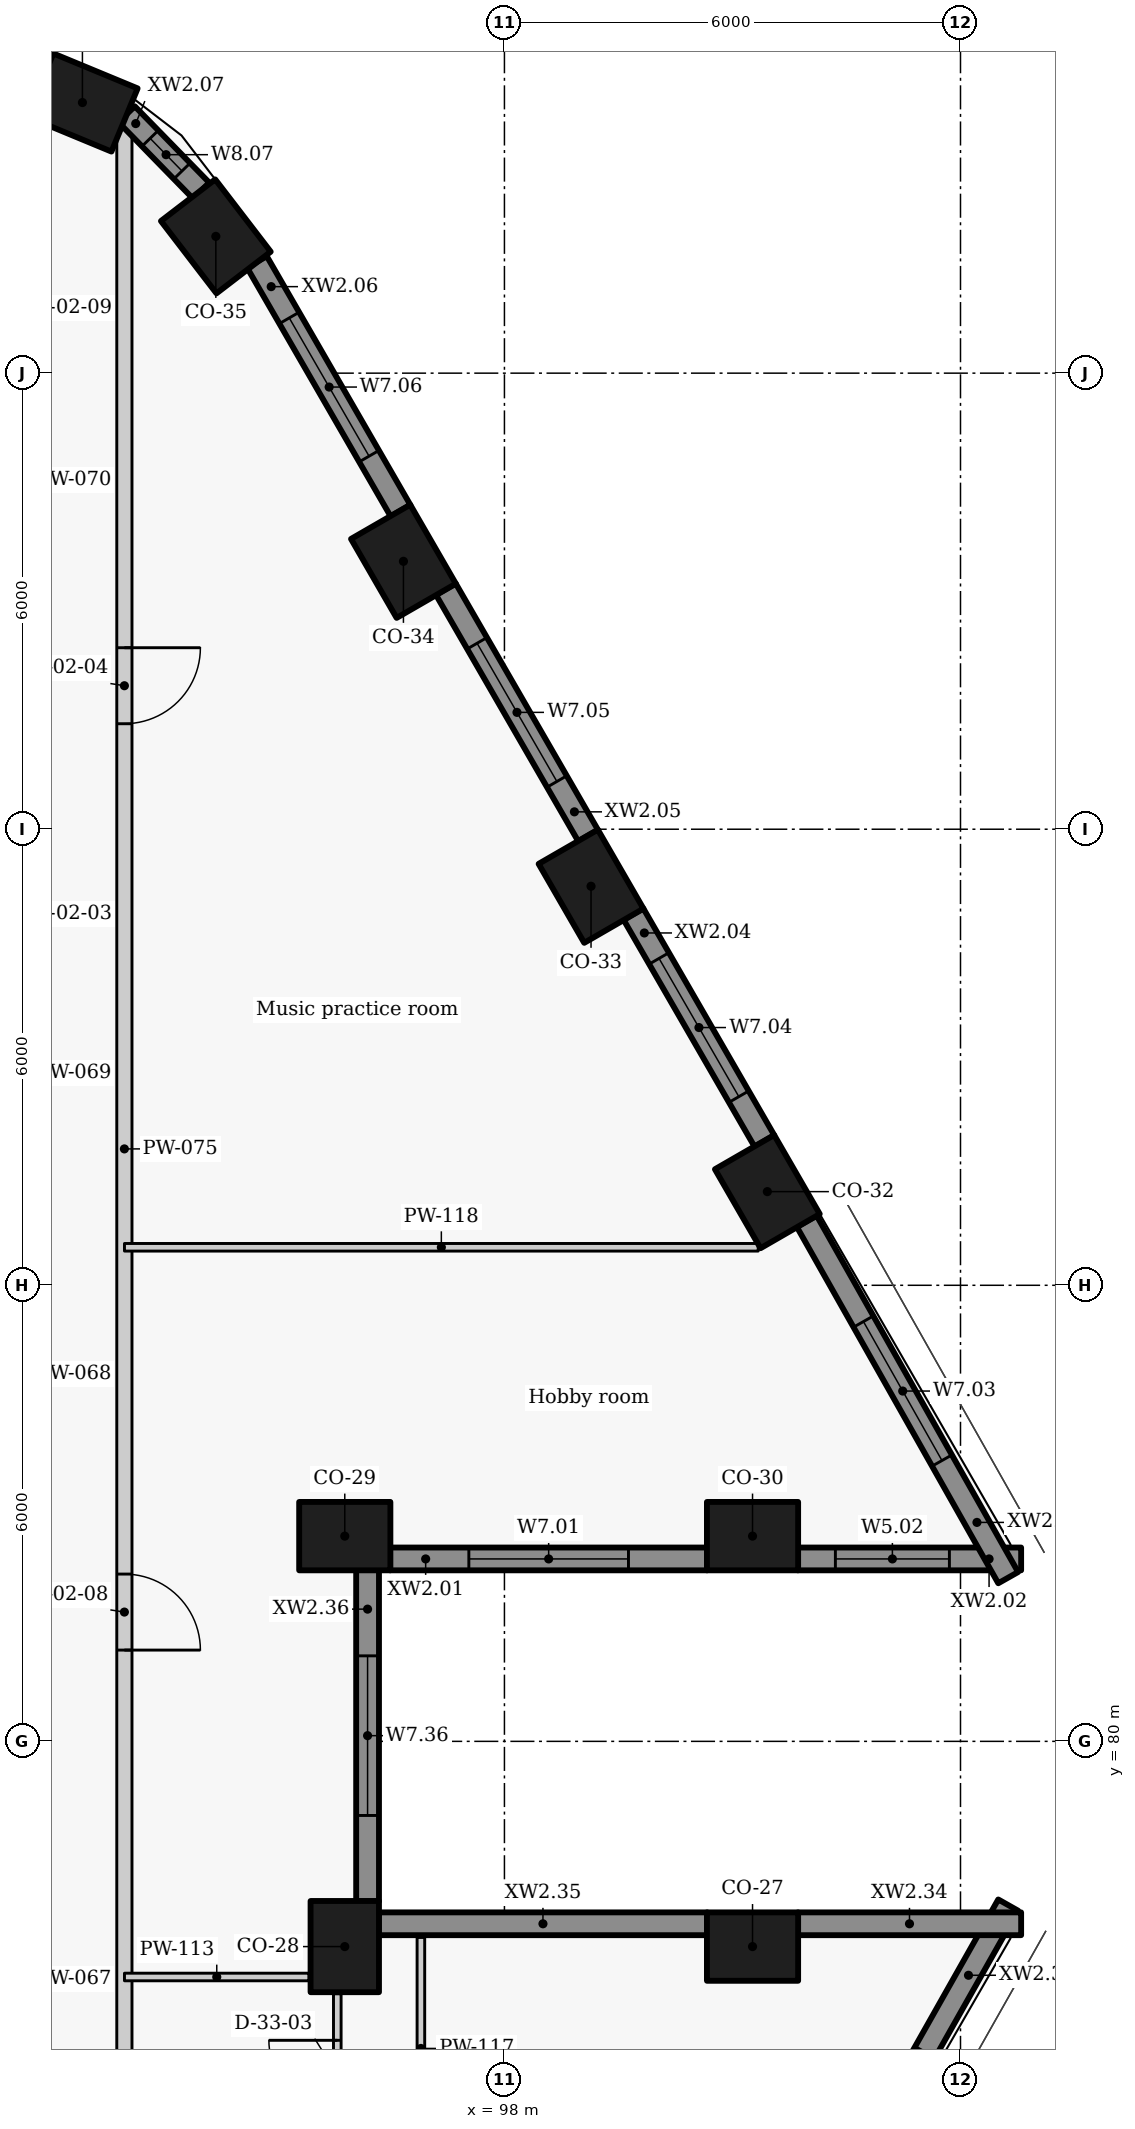
"""IFC4 building model, lengths in metres.
Left out: names, types, materials, properties, quantities, classifications, styles, units other than length and angle.
Written with IfcOpenShell. Run it as: python <this file> out.ifc"""

import sys

from ifc_helpers import new_model, si_unit, direction, frame, frame_2d, origin, origin_2d, place, context, subcontext, project, spatial, rectangle, extrude, element, fill, save


model = new_model("IFC4")
c1 = context("Model", 3, precision=1e-05, world=origin(), true_north=direction((0.0, 1.0)))
c2 = subcontext(c1, "Body", "Model", "MODEL_VIEW")
j1 = project(units=[si_unit("LENGTHUNIT", "METRE"), si_unit("PLANEANGLEUNIT", "RADIAN")], contexts=[c1])
p1 = place(None, origin())
s1 = spatial("IfcSite", under=j1, at=p1, CompositionType="ELEMENT")
p2 = place(p1, origin())
s2 = spatial("IfcBuilding", under=s1, at=p2, CompositionType="ELEMENT")
p3 = place(p2, frame((0.0, 0.0, 213.0)))
s3 = spatial("IfcBuildingStorey", under=s2, at=p3, CompositionType="ELEMENT", Elevation=213.0)
for number, where, z_axis, x_axis in (
    (1, (101.264, 77.3, 0.0), (0.0, 0.0, 1.0), (-1.0, 0.0, 0.0)),
    (2, (95.899, 77.3, 0.0), (0.0, 0.0, 1.0), (0.0, 1.0, 0.0)),
    (3, (95.899, 82.7, 0.0), (0.0, 0.0, 1.0), (1.0, 0.0, 0.0)),
    (4, (101.264, 82.7, 0.0), (0.0, 0.0, 1.0), (1.0, 0.0, 0.0)),
    (5, (101.459, 87.232, 0.0), (0.0, 0.0, 1.0), (-0.5, 0.866, 0.0)),
    (6, (99.139, 91.25, 0.0), (0.0, 0.0, 1.0), (-0.5, 0.866, 0.0)),
    (7, (96.671, 95.525, 0.0), (0.0, 0.0, 1.0), (-0.5, 0.866, 0.0)),
    (8, (94.203, 99.8, 0.0), (0.0, 0.0, 1.0), (-0.609, 0.793, 0.0)),
    (9, (92.448, 101.56, 0.0), (0.0, 0.0, 1.0), (-0.924, 0.383, 0.0)),
):
    element("IfcColumn", number, at=place(p3, frame(where, z_axis=z_axis, x_axis=x_axis)), inside=s3, PredefinedType="COLUMN", context=c2, shape_type="SweptSolid", body=[
        extrude(rectangle(XDim=1.2, YDim=0.9, at=origin_2d()), origin(), (0.0, 0.0, 1.0), 3.3),
    ])
p4 = place(p3, frame((96.496, 82.4, 0.0), z_axis=(0.0, 0.0, 1.0), x_axis=(1.0, 0.0, 0.0)))
e10 = element("IfcWall", 10, at=p4, inside=s3, PredefinedType="SOLIDWALL", context=c2, shape_type="SweptSolid", body=[
    extrude(rectangle(XDim=4.172, YDim=0.3, at=frame_2d((2.086, 0.0))), origin(), (0.0, 0.0, 1.0), 2.425),
])
p5 = place(p4, frame((1.036, 0.0, 0.9)))
e11 = element("IfcOpeningElement", 11, at=p5, cuts=e10, PredefinedType="OPENING", context=c2, shape_type="SweptSolid", body=[
    extrude(rectangle(XDim=2.1, YDim=1.1, at=frame_2d((1.05, 0.55))), frame((0.0, 0.16, 0.0), z_axis=(0.0, -1.0, 0.0), x_axis=(1.0, 0.0, 0.0)), (0.0, 0.0, 1.0), 0.32),
])
p6 = place(p3, frame((101.86, 82.4, 0.0), z_axis=(0.0, 0.0, 1.0), x_axis=(1.0, 0.0, 0.0)))
e12 = element("IfcWall", 12, at=p6, inside=s3, PredefinedType="SOLIDWALL", context=c2, shape_type="SweptSolid", body=[
    extrude(rectangle(XDim=2.938, YDim=0.3, at=frame_2d((1.469, 0.0))), origin(), (0.0, 0.0, 1.0), 2.425),
])
p7 = place(p6, frame((0.494, 0.0, 0.9)))
e13 = element("IfcOpeningElement", 13, at=p7, cuts=e12, PredefinedType="OPENING", context=c2, shape_type="SweptSolid", body=[
    extrude(rectangle(XDim=1.5, YDim=1.1, at=frame_2d((0.75, 0.55))), frame((0.0, 0.16, 0.0), z_axis=(0.0, -1.0, 0.0), x_axis=(1.0, 0.0, 0.0)), (0.0, 0.0, 1.0), 0.32),
])
p8 = place(p3, frame((104.627, 82.154, 0.0), z_axis=(0.0, 0.0, 1.0), x_axis=(-0.492033360928, 0.870576344575, 0.0)))
e14 = element("IfcWall", 14, at=p8, inside=s3, PredefinedType="SOLIDWALL", context=c2, shape_type="SweptSolid", body=[
    extrude(rectangle(XDim=5.387, YDim=0.3, at=frame_2d((2.693, 0.0))), origin(), (0.0, 0.0, 1.0), 2.425),
])
p9 = place(p8, frame((1.77, 0.0, 0.9)))
e15 = element("IfcOpeningElement", 15, at=p9, cuts=e14, PredefinedType="OPENING", context=c2, shape_type="SweptSolid", body=[
    extrude(rectangle(XDim=2.1, YDim=1.1, at=frame_2d((1.05, 0.55))), frame((0.0, 0.16, 0.0), z_axis=(0.0, -1.0, 0.0), x_axis=(1.0, 0.0, 0.0)), (0.0, 0.0, 1.0), 0.32),
])
p10 = place(p3, frame((101.421, 87.898, 0.0), z_axis=(0.0, 0.0, 1.0), x_axis=(-0.499955427682, 0.866051136095, 0.0)))
e16 = element("IfcWall", 16, at=p10, inside=s3, PredefinedType="SOLIDWALL", context=c2, shape_type="SweptSolid", body=[
    extrude(rectangle(XDim=3.447, YDim=0.3, at=frame_2d((1.724, 0.0))), origin(), (0.0, 0.0, 1.0), 2.425),
])
p11 = place(p10, frame((0.674, 0.0, 0.9)))
e17 = element("IfcOpeningElement", 17, at=p11, cuts=e16, PredefinedType="OPENING", context=c2, shape_type="SweptSolid", body=[
    extrude(rectangle(XDim=2.1, YDim=1.1, at=frame_2d((1.05, 0.55))), frame((0.0, 0.16, 0.0), z_axis=(0.0, -1.0, 0.0), x_axis=(1.0, 0.0, 0.0)), (0.0, 0.0, 1.0), 0.32),
])
p12 = place(p3, frame((99.101, 91.916, 0.0), z_axis=(0.0, 0.0, 1.0), x_axis=(-0.500059225181, 0.86599120741, 0.0)))
e18 = element("IfcWall", 18, at=p12, inside=s3, PredefinedType="SOLIDWALL", context=c2, shape_type="SweptSolid", body=[
    extrude(rectangle(XDim=3.744, YDim=0.3, at=frame_2d((1.872, 0.0))), origin(), (0.0, 0.0, 1.0), 2.425),
])
p13 = place(p12, frame((0.822, 0.0, 0.9)))
e19 = element("IfcOpeningElement", 19, at=p13, cuts=e18, PredefinedType="OPENING", context=c2, shape_type="SweptSolid", body=[
    extrude(rectangle(XDim=2.1, YDim=1.1, at=frame_2d((1.05, 0.55))), frame((0.0, 0.16, 0.0), z_axis=(0.0, -1.0, 0.0), x_axis=(1.0, 0.0, 0.0)), (0.0, 0.0, 1.0), 0.32),
])
p14 = place(p3, frame((96.633, 96.191, 0.0), z_axis=(0.0, 0.0, 1.0), x_axis=(-0.499961087031, 0.866047869032, 0.0)))
e20 = element("IfcWall", 20, at=p14, inside=s3, PredefinedType="SOLIDWALL", context=c2, shape_type="SweptSolid", body=[
    extrude(rectangle(XDim=3.779, YDim=0.3, at=frame_2d((1.889, 0.0))), origin(), (0.0, 0.0, 1.0), 2.425),
])
p15 = place(p14, frame((0.828, 0.0, 0.9)))
e21 = element("IfcOpeningElement", 21, at=p15, cuts=e20, PredefinedType="OPENING", context=c2, shape_type="SweptSolid", body=[
    extrude(rectangle(XDim=2.1, YDim=1.1, at=frame_2d((1.05, 0.55))), frame((0.0, 0.16, 0.0), z_axis=(0.0, -1.0, 0.0), x_axis=(1.0, 0.0, 0.0)), (0.0, 0.0, 1.0), 0.32),
])
p16 = place(p3, frame((94.009, 100.402, 0.0), z_axis=(0.0, 0.0, 1.0), x_axis=(-0.69817596362, 0.715926199984, 0.0)))
e22 = element("IfcWall", 22, at=p16, inside=s3, PredefinedType="SOLIDWALL", context=c2, shape_type="SweptSolid", body=[
    extrude(rectangle(XDim=1.403, YDim=0.3, at=frame_2d((0.701, 0.0))), origin(), (0.0, 0.0, 1.0), 2.425),
])
p17 = place(p16, frame((0.36, 0.0, 0.9)))
e23 = element("IfcOpeningElement", 23, at=p17, cuts=e22, PredefinedType="OPENING", context=c2, shape_type="SweptSolid", body=[
    extrude(rectangle(XDim=0.6, YDim=1.1, at=frame_2d((0.3, 0.55))), frame((0.0, 0.16, 0.0), z_axis=(0.0, -1.0, 0.0), x_axis=(1.0, 0.0, 0.0)), (0.0, 0.0, 1.0), 0.32),
])
p18 = place(p3, frame((101.977, 73.157, 0.0), z_axis=(0.0, 0.0, 1.0), x_axis=(0.492033360928, 0.870576344575, 0.0)))
e24 = element("IfcWall", 24, at=p18, inside=s3, PredefinedType="SOLIDWALL", context=c2, shape_type="SweptSolid", body=[
    extrude(rectangle(XDim=5.387, YDim=0.3, at=frame_2d((2.693, 0.0))), origin(), (0.0, 0.0, 1.0), 2.425),
])
p19 = place(p18, frame((1.064, 0.0, 0.9)))
e25 = element("IfcOpeningElement", 25, at=p19, cuts=e24, PredefinedType="OPENING", context=c2, shape_type="SweptSolid", body=[
    extrude(rectangle(XDim=2.1, YDim=1.1, at=frame_2d((1.05, 0.55))), frame((0.0, 0.16, 0.0), z_axis=(0.0, -1.0, 0.0), x_axis=(1.0, 0.0, 0.0)), (0.0, 0.0, 1.0), 0.32),
])
p20 = place(p3, frame((104.798, 77.6, 0.0), z_axis=(0.0, 0.0, 1.0), x_axis=(-1.0, 0.0, 0.0)))
e26 = element("IfcWall", 26, at=p20, inside=s3, PredefinedType="SOLIDWALL", context=c2, shape_type="SweptSolid", body=[
    extrude(rectangle(XDim=2.938, YDim=0.3, at=frame_2d((1.469, 0.0))), origin(), (0.0, 0.0, 1.0), 2.425),
])
p21 = place(p3, frame((100.668, 77.6, 0.0), z_axis=(0.0, 0.0, 1.0), x_axis=(-1.0, 0.0, 0.0)))
e27 = element("IfcWall", 27, at=p21, inside=s3, PredefinedType="SOLIDWALL", context=c2, shape_type="SweptSolid", body=[
    extrude(rectangle(XDim=4.323, YDim=0.3, at=frame_2d((2.161, 0.0))), origin(), (0.0, 0.0, 1.0), 2.425),
])
p22 = place(p3, frame((96.199, 77.896, 0.0), z_axis=(0.0, 0.0, 1.0), x_axis=(0.0, 1.0, 0.0)))
e28 = element("IfcWall", 28, at=p22, inside=s3, PredefinedType="SOLIDWALL", context=c2, shape_type="SweptSolid", body=[
    extrude(rectangle(XDim=4.358, YDim=0.3, at=frame_2d((2.179, 0.0))), origin(), (0.0, 0.0, 1.0), 2.425),
])
p23 = place(p22, frame((1.129, 0.0, 0.9)))
e29 = element("IfcOpeningElement", 29, at=p23, cuts=e28, PredefinedType="OPENING", context=c2, shape_type="SweptSolid", body=[
    extrude(rectangle(XDim=2.1, YDim=1.1, at=frame_2d((1.05, 0.55))), frame((0.0, 0.16, 0.0), z_axis=(0.0, -1.0, 0.0), x_axis=(1.0, 0.0, 0.0)), (0.0, 0.0, 1.0), 0.32),
])
p24 = place(p3, frame((93.0, 101.281, 0.0), z_axis=(0.0, 0.0, 1.0), x_axis=(0.0, -1.0, 0.0)))
e30 = element("IfcWall", 30, at=p24, inside=s3, PredefinedType="PARTITIONING", context=c2, shape_type="SweptSolid", body=[
    extrude(rectangle(XDim=42.606, YDim=0.2, at=frame_2d((21.303, 0.0))), origin(), (0.0, 0.0, 1.0), 2.405),
])
p25 = place(p24, frame((39.33, 0.0, 0.0)))
e31 = element("IfcOpeningElement", 31, at=p25, cuts=e30, PredefinedType="OPENING", context=c2, shape_type="SweptSolid", body=[
    extrude(rectangle(XDim=1.0, YDim=2.1, at=frame_2d((0.5, 1.05))), frame((0.0, 0.11, 0.0), z_axis=(0.0, -1.0, 0.0), x_axis=(1.0, 0.0, 0.0)), (0.0, 0.0, 1.0), 0.22),
])
p26 = place(p24, frame((28.98, 0.0, 0.0)))
e32 = element("IfcOpeningElement", 32, at=p26, cuts=e30, PredefinedType="OPENING", context=c2, shape_type="SweptSolid", body=[
    extrude(rectangle(XDim=1.0, YDim=2.1, at=frame_2d((0.5, 1.05))), frame((0.0, 0.11, 0.0), z_axis=(0.0, -1.0, 0.0), x_axis=(1.0, 0.0, 0.0)), (0.0, 0.0, 1.0), 0.22),
])
p27 = place(p24, frame((6.893, 0.0, 0.0)))
e33 = element("IfcOpeningElement", 33, at=p27, cuts=e30, PredefinedType="OPENING", context=c2, shape_type="SweptSolid", body=[
    extrude(rectangle(XDim=1.0, YDim=2.1, at=frame_2d((0.5, 1.05))), frame((0.0, 0.11, 0.0), z_axis=(0.0, -1.0, 0.0), x_axis=(1.0, 0.0, 0.0)), (0.0, 0.0, 1.0), 0.22),
])
p28 = place(p24, frame((19.08, 0.0, 0.0)))
e34 = element("IfcOpeningElement", 34, at=p28, cuts=e30, PredefinedType="OPENING", context=c2, shape_type="SweptSolid", body=[
    extrude(rectangle(XDim=1.0, YDim=2.1, at=frame_2d((0.5, 1.05))), frame((0.0, 0.11, 0.0), z_axis=(0.0, -1.0, 0.0), x_axis=(1.0, 0.0, 0.0)), (0.0, 0.0, 1.0), 0.22),
])
p29 = place(p3, frame((93.001, 76.9, 0.0), z_axis=(0.0, 0.0, 1.0), x_axis=(1.0, 0.0, 0.0)))
e35 = element("IfcWall", 35, at=p29, inside=s3, PredefinedType="PARTITIONING", context=c2, shape_type="SweptSolid", body=[
    extrude(rectangle(XDim=2.428, YDim=0.1, at=frame_2d((1.214, 0.0))), origin(), (0.0, 0.0, 1.0), 3.025),
])
p30 = place(p3, frame((95.801, 72.6, 0.0), z_axis=(0.0, 0.0, 1.0), x_axis=(0.0, 1.0, 0.0)))
e36 = element("IfcWall", 36, at=p30, inside=s3, PredefinedType="PARTITIONING", context=c2, shape_type="SweptSolid", body=[
    extrude(rectangle(XDim=4.08, YDim=0.1, at=frame_2d((2.04, 0.0))), origin(), (0.0, 0.0, 1.0), 3.025),
])
p31 = place(p30, frame((2.567, 0.0, 0.0)))
e37 = element("IfcOpeningElement", 37, at=p31, cuts=e36, PredefinedType="OPENING", context=c2, shape_type="SweptSolid", body=[
    extrude(rectangle(XDim=0.9, YDim=2.1, at=frame_2d((0.45, 1.05))), frame((0.0, 0.06, 0.0), z_axis=(0.0, -1.0, 0.0), x_axis=(1.0, 0.0, 0.0)), (0.0, 0.0, 1.0), 0.12),
])
p32 = place(p3, frame((96.901, 77.42, 0.0), z_axis=(0.0, 0.0, 1.0), x_axis=(0.0, -1.0, 0.0)))
e38 = element("IfcWall", 38, at=p32, inside=s3, PredefinedType="PARTITIONING", context=c2, shape_type="SweptSolid", body=[
    extrude(rectangle(XDim=6.42, YDim=0.1, at=frame_2d((3.21, 0.0))), origin(), (0.0, 0.0, 1.0), 2.405),
])
p33 = place(p32, frame((3.02, 0.0, 0.0)))
e39 = element("IfcOpeningElement", 39, at=p33, cuts=e38, PredefinedType="OPENING", context=c2, shape_type="SweptSolid", body=[
    extrude(rectangle(XDim=0.9, YDim=2.1, at=frame_2d((0.45, 1.05))), frame((0.0, 0.06, 0.0), z_axis=(0.0, -1.0, 0.0), x_axis=(1.0, 0.0, 0.0)), (0.0, 0.0, 1.0), 0.12),
])
p34 = place(p3, frame((93.001, 86.5, 0.0), z_axis=(0.0, 0.0, 1.0), x_axis=(1.0, 0.0, 0.0)))
e40 = element("IfcWall", 40, at=p34, inside=s3, PredefinedType="PARTITIONING", context=c2, shape_type="SweptSolid", body=[
    extrude(rectangle(XDim=8.338, YDim=0.1, at=frame_2d((4.169, 0.0))), origin(), (0.0, 0.0, 1.0), 3.025),
])
p35 = place(p5, origin())
e41 = element("IfcWindow", 41, at=p35, inside=s3, PartitioningType="SINGLE_PANEL", PredefinedType="WINDOW", context=c2, shape_type="SweptSolid", body=[
    extrude(rectangle(XDim=2.1, YDim=1.1, at=frame_2d((1.05, 0.55))), frame((0.0, 0.03, 0.0), z_axis=(0.0, -1.0, 0.0), x_axis=(1.0, 0.0, 0.0)), (0.0, 0.0, 1.0), 0.06),
])
fill(e11, e41)
p36 = place(p7, origin())
e42 = element("IfcWindow", 42, at=p36, inside=s3, PartitioningType="SINGLE_PANEL", PredefinedType="WINDOW", context=c2, shape_type="SweptSolid", body=[
    extrude(rectangle(XDim=1.5, YDim=1.1, at=frame_2d((0.75, 0.55))), frame((0.0, 0.03, 0.0), z_axis=(0.0, -1.0, 0.0), x_axis=(1.0, 0.0, 0.0)), (0.0, 0.0, 1.0), 0.06),
])
fill(e13, e42)
p37 = place(p9, origin())
e43 = element("IfcWindow", 43, at=p37, inside=s3, PartitioningType="SINGLE_PANEL", PredefinedType="WINDOW", context=c2, shape_type="SweptSolid", body=[
    extrude(rectangle(XDim=2.1, YDim=1.1, at=frame_2d((1.05, 0.55))), frame((0.0, 0.03, 0.0), z_axis=(0.0, -1.0, 0.0), x_axis=(1.0, 0.0, 0.0)), (0.0, 0.0, 1.0), 0.06),
])
fill(e15, e43)
p38 = place(p11, origin())
e44 = element("IfcWindow", 44, at=p38, inside=s3, PartitioningType="SINGLE_PANEL", PredefinedType="WINDOW", context=c2, shape_type="SweptSolid", body=[
    extrude(rectangle(XDim=2.1, YDim=1.1, at=frame_2d((1.05, 0.55))), frame((0.0, 0.03, 0.0), z_axis=(0.0, -1.0, 0.0), x_axis=(1.0, 0.0, 0.0)), (0.0, 0.0, 1.0), 0.06),
])
fill(e17, e44)
p39 = place(p13, origin())
e45 = element("IfcWindow", 45, at=p39, inside=s3, PartitioningType="SINGLE_PANEL", PredefinedType="WINDOW", context=c2, shape_type="SweptSolid", body=[
    extrude(rectangle(XDim=2.1, YDim=1.1, at=frame_2d((1.05, 0.55))), frame((0.0, 0.03, 0.0), z_axis=(0.0, -1.0, 0.0), x_axis=(1.0, 0.0, 0.0)), (0.0, 0.0, 1.0), 0.06),
])
fill(e19, e45)
p40 = place(p15, origin())
e46 = element("IfcWindow", 46, at=p40, inside=s3, PartitioningType="SINGLE_PANEL", PredefinedType="WINDOW", context=c2, shape_type="SweptSolid", body=[
    extrude(rectangle(XDim=2.1, YDim=1.1, at=frame_2d((1.05, 0.55))), frame((0.0, 0.03, 0.0), z_axis=(0.0, -1.0, 0.0), x_axis=(1.0, 0.0, 0.0)), (0.0, 0.0, 1.0), 0.06),
])
fill(e21, e46)
p41 = place(p17, origin())
e47 = element("IfcWindow", 47, at=p41, inside=s3, PartitioningType="SINGLE_PANEL", PredefinedType="WINDOW", context=c2, shape_type="SweptSolid", body=[
    extrude(rectangle(XDim=0.6, YDim=1.1, at=frame_2d((0.3, 0.55))), frame((0.0, 0.03, 0.0), z_axis=(0.0, -1.0, 0.0), x_axis=(1.0, 0.0, 0.0)), (0.0, 0.0, 1.0), 0.06),
])
fill(e23, e47)
p42 = place(p23, origin())
e48 = element("IfcWindow", 48, at=p42, inside=s3, PartitioningType="SINGLE_PANEL", PredefinedType="WINDOW", context=c2, shape_type="SweptSolid", body=[
    extrude(rectangle(XDim=2.1, YDim=1.1, at=frame_2d((1.05, 0.55))), frame((0.0, 0.03, 0.0), z_axis=(0.0, -1.0, 0.0), x_axis=(1.0, 0.0, 0.0)), (0.0, 0.0, 1.0), 0.06),
])
fill(e29, e48)
p43 = place(p31, origin())
e49 = element("IfcDoor", 49, at=p43, inside=s3, OperationType="SINGLE_SWING_RIGHT", PredefinedType="DOOR", context=c2, shape_type="SweptSolid", body=[
    extrude(rectangle(XDim=0.9, YDim=2.1, at=frame_2d((0.45, 1.05))), frame((0.0, 0.025, 0.0), z_axis=(0.0, -1.0, 0.0), x_axis=(1.0, 0.0, 0.0)), (0.0, 0.0, 1.0), 0.05),
])
fill(e37, e49)
p44 = place(p27, origin())
e50 = element("IfcDoor", 50, at=p44, inside=s3, OperationType="SINGLE_SWING_LEFT", PredefinedType="DOOR", context=c2, shape_type="SweptSolid", body=[
    extrude(rectangle(XDim=1.0, YDim=2.1, at=frame_2d((0.5, 1.05))), frame((0.0, 0.025, 0.0), z_axis=(0.0, -1.0, 0.0), x_axis=(1.0, 0.0, 0.0)), (0.0, 0.0, 1.0), 0.05),
])
fill(e33, e50)
p45 = place(p28, origin())
e51 = element("IfcDoor", 51, at=p45, inside=s3, OperationType="SINGLE_SWING_RIGHT", PredefinedType="DOOR", context=c2, shape_type="SweptSolid", body=[
    extrude(rectangle(XDim=1.0, YDim=2.1, at=frame_2d((0.5, 1.05))), frame((0.0, 0.025, 0.0), z_axis=(0.0, -1.0, 0.0), x_axis=(1.0, 0.0, 0.0)), (0.0, 0.0, 1.0), 0.05),
])
fill(e34, e51)
save(model, sys.argv[1])
